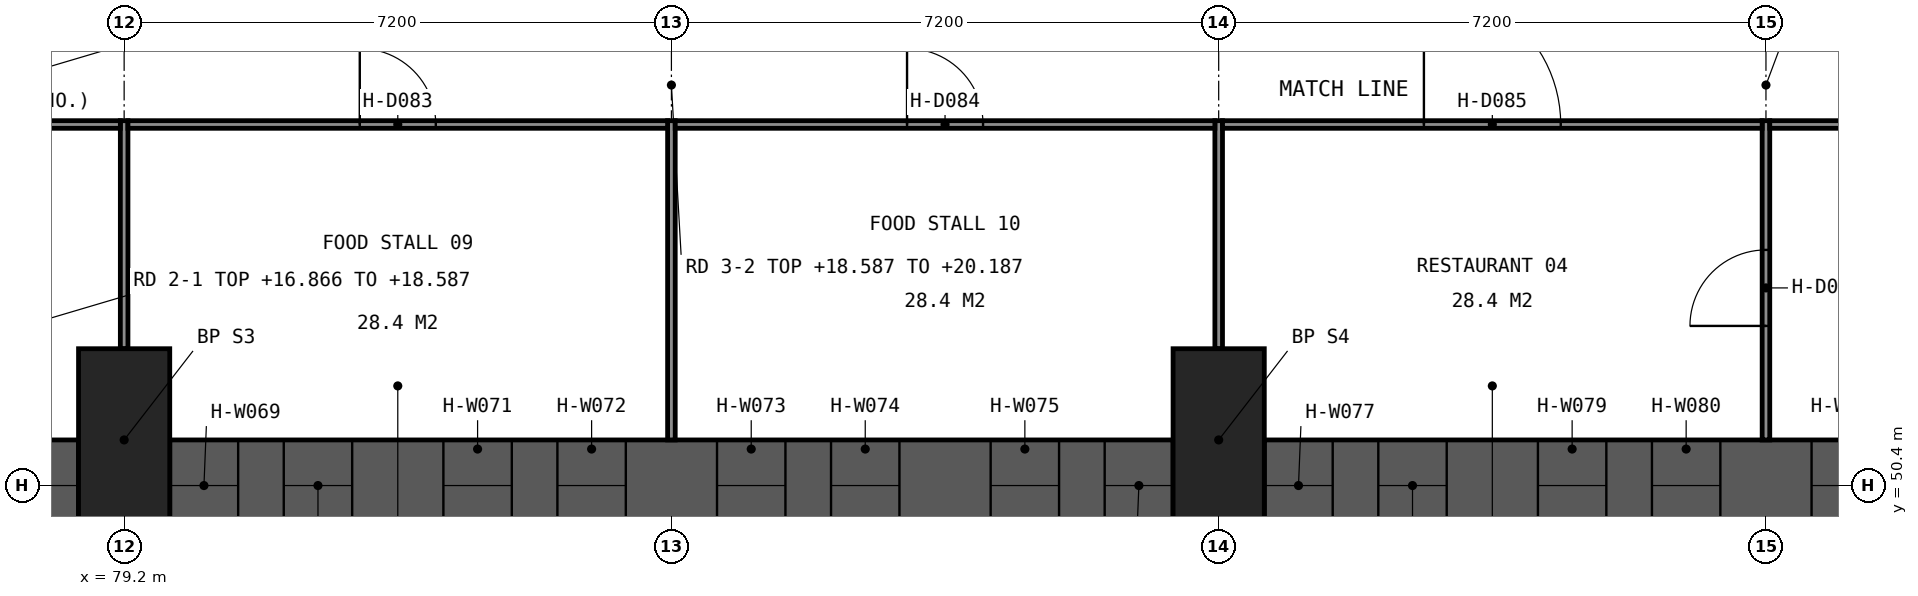
"""IFC4 building model, lengths in metres.
Left out: names, types, materials, properties, quantities, classifications, styles, units other than length and angle.
Written with IfcOpenShell. Run it as: python <this file> out.ifc"""

import sys

from ifc_helpers import new_model, si_unit, direction, frame, frame_2d, origin, origin_2d, place, context, subcontext, project, spatial, rectangle, extrude, element, fill, save


model = new_model("IFC4")
c1 = context("Model", 3, precision=1e-05, world=origin(), true_north=direction((0.0, 1.0)))
c2 = subcontext(c1, "Body", "Model", "MODEL_VIEW")
j1 = project(units=[si_unit("LENGTHUNIT", "METRE"), si_unit("PLANEANGLEUNIT", "RADIAN")], contexts=[c1])
p1 = place(None, origin())
s1 = spatial("IfcSite", under=j1, at=p1, CompositionType="ELEMENT")
p2 = place(p1, origin())
s2 = spatial("IfcBuilding", under=s1, at=p2, CompositionType="ELEMENT")
p3 = place(p2, frame((0.0, 0.0, 9.6)))
s3 = spatial("IfcBuildingStorey", under=s2, at=p3, CompositionType="ELEMENT", Elevation=9.6)
for number, where, z_axis, x_axis in (
    (1, (79.2, 51.0, 0.0), (0.0, 0.0, 1.0), (1.0, 0.0, 0.0)),
    (2, (93.6, 51.0, 0.0), (0.0, 0.0, 1.0), (1.0, 0.0, 0.0)),
):
    element("IfcColumn", number, at=place(p3, frame(where, z_axis=z_axis, x_axis=x_axis)), inside=s3, PredefinedType="COLUMN", context=c2, shape_type="SweptSolid", body=[
        extrude(rectangle(XDim=1.2, YDim=2.4, at=origin_2d()), origin(), (0.0, 0.0, 1.0), 5.4),
    ])
p4 = place(p3, frame((65.4, 50.4, 0.0), z_axis=(0.0, 0.0, 1.0), x_axis=(1.0, 0.0, 0.0)))
e3 = element("IfcWall", 3, at=p4, inside=s3, PredefinedType="SOLIDWALL", context=c2, shape_type="SweptSolid", body=[
    extrude(rectangle(XDim=13.2, YDim=1.2, at=frame_2d((6.6, 0.0))), origin(), (0.0, 0.0, 1.0), 6.6),
])
p5 = place(p4, frame((0.0, 0.0, 1.2)))
e4 = element("IfcOpeningElement", 4, at=p5, cuts=e3, PredefinedType="OPENING", context=c2, shape_type="SweptSolid", body=[
    extrude(rectangle(XDim=0.9, YDim=4.5, at=frame_2d((0.45, 2.25))), frame((0.0, 0.61, 0.0), z_axis=(0.0, -1.0, 0.0), x_axis=(1.0, 0.0, 0.0)), (0.0, 0.0, 1.0), 1.22),
])
p6 = place(p4, frame((1.5, 0.0, 1.2)))
e5 = element("IfcOpeningElement", 5, at=p6, cuts=e3, PredefinedType="OPENING", context=c2, shape_type="SweptSolid", body=[
    extrude(rectangle(XDim=0.9, YDim=4.5, at=frame_2d((0.45, 2.25))), frame((0.0, 0.61, 0.0), z_axis=(0.0, -1.0, 0.0), x_axis=(1.0, 0.0, 0.0)), (0.0, 0.0, 1.0), 1.22),
])
p7 = place(p4, frame((3.6, 0.0, 1.2)))
e6 = element("IfcOpeningElement", 6, at=p7, cuts=e3, PredefinedType="OPENING", context=c2, shape_type="SweptSolid", body=[
    extrude(rectangle(XDim=0.9, YDim=4.5, at=frame_2d((0.45, 2.25))), frame((0.0, 0.61, 0.0), z_axis=(0.0, -1.0, 0.0), x_axis=(1.0, 0.0, 0.0)), (0.0, 0.0, 1.0), 1.22),
])
p8 = place(p4, frame((5.1, 0.0, 1.2)))
e7 = element("IfcOpeningElement", 7, at=p8, cuts=e3, PredefinedType="OPENING", context=c2, shape_type="SweptSolid", body=[
    extrude(rectangle(XDim=0.9, YDim=4.5, at=frame_2d((0.45, 2.25))), frame((0.0, 0.61, 0.0), z_axis=(0.0, -1.0, 0.0), x_axis=(1.0, 0.0, 0.0)), (0.0, 0.0, 1.0), 1.22),
])
p9 = place(p4, frame((7.2, 0.0, 1.2)))
e8 = element("IfcOpeningElement", 8, at=p9, cuts=e3, PredefinedType="OPENING", context=c2, shape_type="SweptSolid", body=[
    extrude(rectangle(XDim=0.9, YDim=4.5, at=frame_2d((0.45, 2.25))), frame((0.0, 0.61, 0.0), z_axis=(0.0, -1.0, 0.0), x_axis=(1.0, 0.0, 0.0)), (0.0, 0.0, 1.0), 1.22),
])
p10 = place(p4, frame((8.7, 0.0, 1.2)))
e9 = element("IfcOpeningElement", 9, at=p10, cuts=e3, PredefinedType="OPENING", context=c2, shape_type="SweptSolid", body=[
    extrude(rectangle(XDim=0.9, YDim=4.5, at=frame_2d((0.45, 2.25))), frame((0.0, 0.61, 0.0), z_axis=(0.0, -1.0, 0.0), x_axis=(1.0, 0.0, 0.0)), (0.0, 0.0, 1.0), 1.22),
])
p11 = place(p4, frame((10.8, 0.0, 1.2)))
e10 = element("IfcOpeningElement", 10, at=p11, cuts=e3, PredefinedType="OPENING", context=c2, shape_type="SweptSolid", body=[
    extrude(rectangle(XDim=0.9, YDim=4.5, at=frame_2d((0.45, 2.25))), frame((0.0, 0.61, 0.0), z_axis=(0.0, -1.0, 0.0), x_axis=(1.0, 0.0, 0.0)), (0.0, 0.0, 1.0), 1.22),
])
p12 = place(p4, frame((12.3, 0.0, 1.2)))
e11 = element("IfcOpeningElement", 11, at=p12, cuts=e3, PredefinedType="OPENING", context=c2, shape_type="SweptSolid", body=[
    extrude(rectangle(XDim=0.9, YDim=4.5, at=frame_2d((0.45, 2.25))), frame((0.0, 0.61, 0.0), z_axis=(0.0, -1.0, 0.0), x_axis=(1.0, 0.0, 0.0)), (0.0, 0.0, 1.0), 1.22),
])
p13 = place(p3, frame((79.8, 50.4, 0.0), z_axis=(0.0, 0.0, 1.0), x_axis=(1.0, 0.0, 0.0)))
e12 = element("IfcWall", 12, at=p13, inside=s3, PredefinedType="SOLIDWALL", context=c2, shape_type="SweptSolid", body=[
    extrude(rectangle(XDim=13.2, YDim=1.2, at=frame_2d((6.6, 0.0))), origin(), (0.0, 0.0, 1.0), 6.6),
])
p14 = place(p13, frame((0.0, 0.0, 1.2)))
e13 = element("IfcOpeningElement", 13, at=p14, cuts=e12, PredefinedType="OPENING", context=c2, shape_type="SweptSolid", body=[
    extrude(rectangle(XDim=0.9, YDim=4.5, at=frame_2d((0.45, 2.25))), frame((0.0, 0.61, 0.0), z_axis=(0.0, -1.0, 0.0), x_axis=(1.0, 0.0, 0.0)), (0.0, 0.0, 1.0), 1.22),
])
p15 = place(p13, frame((1.5, 0.0, 1.2)))
e14 = element("IfcOpeningElement", 14, at=p15, cuts=e12, PredefinedType="OPENING", context=c2, shape_type="SweptSolid", body=[
    extrude(rectangle(XDim=0.9, YDim=4.5, at=frame_2d((0.45, 2.25))), frame((0.0, 0.61, 0.0), z_axis=(0.0, -1.0, 0.0), x_axis=(1.0, 0.0, 0.0)), (0.0, 0.0, 1.0), 1.22),
])
p16 = place(p13, frame((3.6, 0.0, 1.2)))
e15 = element("IfcOpeningElement", 15, at=p16, cuts=e12, PredefinedType="OPENING", context=c2, shape_type="SweptSolid", body=[
    extrude(rectangle(XDim=0.9, YDim=4.5, at=frame_2d((0.45, 2.25))), frame((0.0, 0.61, 0.0), z_axis=(0.0, -1.0, 0.0), x_axis=(1.0, 0.0, 0.0)), (0.0, 0.0, 1.0), 1.22),
])
p17 = place(p13, frame((5.1, 0.0, 1.2)))
e16 = element("IfcOpeningElement", 16, at=p17, cuts=e12, PredefinedType="OPENING", context=c2, shape_type="SweptSolid", body=[
    extrude(rectangle(XDim=0.9, YDim=4.5, at=frame_2d((0.45, 2.25))), frame((0.0, 0.61, 0.0), z_axis=(0.0, -1.0, 0.0), x_axis=(1.0, 0.0, 0.0)), (0.0, 0.0, 1.0), 1.22),
])
p18 = place(p13, frame((7.2, 0.0, 1.2)))
e17 = element("IfcOpeningElement", 17, at=p18, cuts=e12, PredefinedType="OPENING", context=c2, shape_type="SweptSolid", body=[
    extrude(rectangle(XDim=0.9, YDim=4.5, at=frame_2d((0.45, 2.25))), frame((0.0, 0.61, 0.0), z_axis=(0.0, -1.0, 0.0), x_axis=(1.0, 0.0, 0.0)), (0.0, 0.0, 1.0), 1.22),
])
p19 = place(p13, frame((8.7, 0.0, 1.2)))
e18 = element("IfcOpeningElement", 18, at=p19, cuts=e12, PredefinedType="OPENING", context=c2, shape_type="SweptSolid", body=[
    extrude(rectangle(XDim=0.9, YDim=4.5, at=frame_2d((0.45, 2.25))), frame((0.0, 0.61, 0.0), z_axis=(0.0, -1.0, 0.0), x_axis=(1.0, 0.0, 0.0)), (0.0, 0.0, 1.0), 1.22),
])
p20 = place(p13, frame((10.8, 0.0, 1.2)))
e19 = element("IfcOpeningElement", 19, at=p20, cuts=e12, PredefinedType="OPENING", context=c2, shape_type="SweptSolid", body=[
    extrude(rectangle(XDim=0.9, YDim=4.5, at=frame_2d((0.45, 2.25))), frame((0.0, 0.61, 0.0), z_axis=(0.0, -1.0, 0.0), x_axis=(1.0, 0.0, 0.0)), (0.0, 0.0, 1.0), 1.22),
])
p21 = place(p13, frame((12.3, 0.0, 1.2)))
e20 = element("IfcOpeningElement", 20, at=p21, cuts=e12, PredefinedType="OPENING", context=c2, shape_type="SweptSolid", body=[
    extrude(rectangle(XDim=0.9, YDim=4.5, at=frame_2d((0.45, 2.25))), frame((0.0, 0.61, 0.0), z_axis=(0.0, -1.0, 0.0), x_axis=(1.0, 0.0, 0.0)), (0.0, 0.0, 1.0), 1.22),
])
p22 = place(p3, frame((94.2, 50.4, 0.0), z_axis=(0.0, 0.0, 1.0), x_axis=(1.0, 0.0, 0.0)))
e21 = element("IfcWall", 21, at=p22, inside=s3, PredefinedType="SOLIDWALL", context=c2, shape_type="SweptSolid", body=[
    extrude(rectangle(XDim=13.2, YDim=1.2, at=frame_2d((6.6, 0.0))), origin(), (0.0, 0.0, 1.0), 6.6),
])
p23 = place(p22, frame((0.0, 0.0, 1.2)))
e22 = element("IfcOpeningElement", 22, at=p23, cuts=e21, PredefinedType="OPENING", context=c2, shape_type="SweptSolid", body=[
    extrude(rectangle(XDim=0.9, YDim=4.5, at=frame_2d((0.45, 2.25))), frame((0.0, 0.61, 0.0), z_axis=(0.0, -1.0, 0.0), x_axis=(1.0, 0.0, 0.0)), (0.0, 0.0, 1.0), 1.22),
])
p24 = place(p22, frame((1.5, 0.0, 1.2)))
e23 = element("IfcOpeningElement", 23, at=p24, cuts=e21, PredefinedType="OPENING", context=c2, shape_type="SweptSolid", body=[
    extrude(rectangle(XDim=0.9, YDim=4.5, at=frame_2d((0.45, 2.25))), frame((0.0, 0.61, 0.0), z_axis=(0.0, -1.0, 0.0), x_axis=(1.0, 0.0, 0.0)), (0.0, 0.0, 1.0), 1.22),
])
p25 = place(p22, frame((3.6, 0.0, 1.2)))
e24 = element("IfcOpeningElement", 24, at=p25, cuts=e21, PredefinedType="OPENING", context=c2, shape_type="SweptSolid", body=[
    extrude(rectangle(XDim=0.9, YDim=4.5, at=frame_2d((0.45, 2.25))), frame((0.0, 0.61, 0.0), z_axis=(0.0, -1.0, 0.0), x_axis=(1.0, 0.0, 0.0)), (0.0, 0.0, 1.0), 1.22),
])
p26 = place(p22, frame((5.1, 0.0, 1.2)))
e25 = element("IfcOpeningElement", 25, at=p26, cuts=e21, PredefinedType="OPENING", context=c2, shape_type="SweptSolid", body=[
    extrude(rectangle(XDim=0.9, YDim=4.5, at=frame_2d((0.45, 2.25))), frame((0.0, 0.61, 0.0), z_axis=(0.0, -1.0, 0.0), x_axis=(1.0, 0.0, 0.0)), (0.0, 0.0, 1.0), 1.22),
])
p27 = place(p22, frame((7.2, 0.0, 1.2)))
e26 = element("IfcOpeningElement", 26, at=p27, cuts=e21, PredefinedType="OPENING", context=c2, shape_type="SweptSolid", body=[
    extrude(rectangle(XDim=0.9, YDim=4.5, at=frame_2d((0.45, 2.25))), frame((0.0, 0.61, 0.0), z_axis=(0.0, -1.0, 0.0), x_axis=(1.0, 0.0, 0.0)), (0.0, 0.0, 1.0), 1.22),
])
p28 = place(p22, frame((8.7, 0.0, 1.2)))
e27 = element("IfcOpeningElement", 27, at=p28, cuts=e21, PredefinedType="OPENING", context=c2, shape_type="SweptSolid", body=[
    extrude(rectangle(XDim=0.9, YDim=4.5, at=frame_2d((0.45, 2.25))), frame((0.0, 0.61, 0.0), z_axis=(0.0, -1.0, 0.0), x_axis=(1.0, 0.0, 0.0)), (0.0, 0.0, 1.0), 1.22),
])
p29 = place(p22, frame((10.8, 0.0, 1.2)))
e28 = element("IfcOpeningElement", 28, at=p29, cuts=e21, PredefinedType="OPENING", context=c2, shape_type="SweptSolid", body=[
    extrude(rectangle(XDim=0.9, YDim=4.5, at=frame_2d((0.45, 2.25))), frame((0.0, 0.61, 0.0), z_axis=(0.0, -1.0, 0.0), x_axis=(1.0, 0.0, 0.0)), (0.0, 0.0, 1.0), 1.22),
])
p30 = place(p22, frame((12.3, 0.0, 1.2)))
e29 = element("IfcOpeningElement", 29, at=p30, cuts=e21, PredefinedType="OPENING", context=c2, shape_type="SweptSolid", body=[
    extrude(rectangle(XDim=0.9, YDim=4.5, at=frame_2d((0.45, 2.25))), frame((0.0, 0.61, 0.0), z_axis=(0.0, -1.0, 0.0), x_axis=(1.0, 0.0, 0.0)), (0.0, 0.0, 1.0), 1.22),
])
p31 = place(p3, frame((79.2, 52.2, 0.0), z_axis=(0.0, 0.0, 1.0), x_axis=(0.0, 1.0, 0.0)))
e30 = element("IfcWall", 30, at=p31, inside=s3, PredefinedType="PARTITIONING", context=c2, shape_type="SweptSolid", body=[
    extrude(rectangle(XDim=3.0, YDim=0.1, at=frame_2d((1.5, 0.0))), origin(), (0.0, 0.0, 1.0), 4.7),
])
p32 = place(p3, frame((86.4, 51.0, 0.0), z_axis=(0.0, 0.0, 1.0), x_axis=(0.0, 1.0, 0.0)))
e31 = element("IfcWall", 31, at=p32, inside=s3, PredefinedType="PARTITIONING", context=c2, shape_type="SweptSolid", body=[
    extrude(rectangle(XDim=4.2, YDim=0.1, at=frame_2d((2.1, 0.0))), origin(), (0.0, 0.0, 1.0), 4.7),
])
p33 = place(p3, frame((93.6, 52.2, 0.0), z_axis=(0.0, 0.0, 1.0), x_axis=(0.0, 1.0, 0.0)))
e32 = element("IfcWall", 32, at=p33, inside=s3, PredefinedType="PARTITIONING", context=c2, shape_type="SweptSolid", body=[
    extrude(rectangle(XDim=3.0, YDim=0.1, at=frame_2d((1.5, 0.0))), origin(), (0.0, 0.0, 1.0), 4.7),
])
p34 = place(p3, frame((100.8, 51.0, 0.0), z_axis=(0.0, 0.0, 1.0), x_axis=(0.0, 1.0, 0.0)))
e33 = element("IfcWall", 33, at=p34, inside=s3, PredefinedType="PARTITIONING", context=c2, shape_type="SweptSolid", body=[
    extrude(rectangle(XDim=4.2, YDim=0.1, at=frame_2d((2.1, 0.0))), origin(), (0.0, 0.0, 1.0), 4.7),
])
p35 = place(p34, frame((1.5, 0.0, 0.0)))
e34 = element("IfcOpeningElement", 34, at=p35, cuts=e33, PredefinedType="OPENING", context=c2, shape_type="SweptSolid", body=[
    extrude(rectangle(XDim=1.0, YDim=2.1, at=frame_2d((0.5, 1.05))), frame((0.0, 0.06, 0.0), z_axis=(0.0, -1.0, 0.0), x_axis=(1.0, 0.0, 0.0)), (0.0, 0.0, 1.0), 0.12),
])
p36 = place(p3, frame((64.85, 55.15, 0.0), z_axis=(0.0, 0.0, 1.0), x_axis=(1.0, 0.0, 0.0)))
e35 = element("IfcWall", 35, at=p36, inside=s3, PredefinedType="PARTITIONING", context=c2, shape_type="SweptSolid", body=[
    extrude(rectangle(XDim=14.3, YDim=0.1, at=frame_2d((7.15, 0.0))), origin(), (0.0, 0.0, 1.0), 4.7),
])
p37 = place(p36, frame((6.65, 0.0, 0.0)))
e36 = element("IfcOpeningElement", 36, at=p37, cuts=e35, PredefinedType="OPENING", context=c2, shape_type="SweptSolid", body=[
    extrude(rectangle(XDim=1.0, YDim=2.1, at=frame_2d((0.5, 1.05))), frame((0.0, 0.06, 0.0), z_axis=(0.0, -1.0, 0.0), x_axis=(1.0, 0.0, 0.0)), (0.0, 0.0, 1.0), 0.12),
])
p38 = place(p3, frame((79.25, 55.15, 0.0), z_axis=(0.0, 0.0, 1.0), x_axis=(1.0, 0.0, 0.0)))
e37 = element("IfcWall", 37, at=p38, inside=s3, PredefinedType="PARTITIONING", context=c2, shape_type="SweptSolid", body=[
    extrude(rectangle(XDim=7.1, YDim=0.1, at=frame_2d((3.55, 0.0))), origin(), (0.0, 0.0, 1.0), 4.7),
])
p39 = place(p38, frame((3.05, 0.0, 0.0)))
e38 = element("IfcOpeningElement", 38, at=p39, cuts=e37, PredefinedType="OPENING", context=c2, shape_type="SweptSolid", body=[
    extrude(rectangle(XDim=1.0, YDim=2.1, at=frame_2d((0.5, 1.05))), frame((0.0, 0.06, 0.0), z_axis=(0.0, -1.0, 0.0), x_axis=(1.0, 0.0, 0.0)), (0.0, 0.0, 1.0), 0.12),
])
p40 = place(p3, frame((86.45, 55.15, 0.0), z_axis=(0.0, 0.0, 1.0), x_axis=(1.0, 0.0, 0.0)))
e39 = element("IfcWall", 39, at=p40, inside=s3, PredefinedType="PARTITIONING", context=c2, shape_type="SweptSolid", body=[
    extrude(rectangle(XDim=7.1, YDim=0.1, at=frame_2d((3.55, 0.0))), origin(), (0.0, 0.0, 1.0), 4.7),
])
p41 = place(p40, frame((3.05, 0.0, 0.0)))
e40 = element("IfcOpeningElement", 40, at=p41, cuts=e39, PredefinedType="OPENING", context=c2, shape_type="SweptSolid", body=[
    extrude(rectangle(XDim=1.0, YDim=2.1, at=frame_2d((0.5, 1.05))), frame((0.0, 0.06, 0.0), z_axis=(0.0, -1.0, 0.0), x_axis=(1.0, 0.0, 0.0)), (0.0, 0.0, 1.0), 0.12),
])
p42 = place(p3, frame((93.65, 55.15, 0.0), z_axis=(0.0, 0.0, 1.0), x_axis=(1.0, 0.0, 0.0)))
e41 = element("IfcWall", 41, at=p42, inside=s3, PredefinedType="PARTITIONING", context=c2, shape_type="SweptSolid", body=[
    extrude(rectangle(XDim=7.1, YDim=0.1, at=frame_2d((3.55, 0.0))), origin(), (0.0, 0.0, 1.0), 4.7),
])
p43 = place(p42, frame((2.65, 0.0, 0.0)))
e42 = element("IfcOpeningElement", 42, at=p43, cuts=e41, PredefinedType="OPENING", context=c2, shape_type="SweptSolid", body=[
    extrude(rectangle(XDim=1.8, YDim=2.1, at=frame_2d((0.9, 1.05))), frame((0.0, 0.06, 0.0), z_axis=(0.0, -1.0, 0.0), x_axis=(1.0, 0.0, 0.0)), (0.0, 0.0, 1.0), 0.12),
])
p44 = place(p3, frame((100.85, 55.15, 0.0), z_axis=(0.0, 0.0, 1.0), x_axis=(1.0, 0.0, 0.0)))
e43 = element("IfcWall", 43, at=p44, inside=s3, PredefinedType="PARTITIONING", context=c2, shape_type="SweptSolid", body=[
    extrude(rectangle(XDim=7.1, YDim=0.1, at=frame_2d((3.55, 0.0))), origin(), (0.0, 0.0, 1.0), 4.7),
])
p45 = place(p44, frame((3.05, 0.0, 0.0)))
e44 = element("IfcOpeningElement", 44, at=p45, cuts=e43, PredefinedType="OPENING", context=c2, shape_type="SweptSolid", body=[
    extrude(rectangle(XDim=1.0, YDim=2.1, at=frame_2d((0.5, 1.05))), frame((0.0, 0.06, 0.0), z_axis=(0.0, -1.0, 0.0), x_axis=(1.0, 0.0, 0.0)), (0.0, 0.0, 1.0), 0.12),
])
p46 = place(p39, origin())
e45 = element("IfcDoor", 45, at=p46, inside=s3, OperationType="SINGLE_SWING_LEFT", PredefinedType="DOOR", context=c2, shape_type="SweptSolid", body=[
    extrude(rectangle(XDim=1.0, YDim=2.1, at=frame_2d((0.5, 1.05))), frame((0.0, 0.025, 0.0), z_axis=(0.0, -1.0, 0.0), x_axis=(1.0, 0.0, 0.0)), (0.0, 0.0, 1.0), 0.05),
])
fill(e38, e45)
p47 = place(p41, origin())
e46 = element("IfcDoor", 46, at=p47, inside=s3, OperationType="SINGLE_SWING_LEFT", PredefinedType="DOOR", context=c2, shape_type="SweptSolid", body=[
    extrude(rectangle(XDim=1.0, YDim=2.1, at=frame_2d((0.5, 1.05))), frame((0.0, 0.025, 0.0), z_axis=(0.0, -1.0, 0.0), x_axis=(1.0, 0.0, 0.0)), (0.0, 0.0, 1.0), 0.05),
])
fill(e40, e46)
p48 = place(p43, origin())
e47 = element("IfcDoor", 47, at=p48, inside=s3, OperationType="DOUBLE_DOOR_SINGLE_SWING", PredefinedType="DOOR", context=c2, shape_type="SweptSolid", body=[
    extrude(rectangle(XDim=1.8, YDim=2.1, at=frame_2d((0.9, 1.05))), frame((0.0, 0.025, 0.0), z_axis=(0.0, -1.0, 0.0), x_axis=(1.0, 0.0, 0.0)), (0.0, 0.0, 1.0), 0.05),
])
fill(e42, e47)
p49 = place(p35, origin())
e48 = element("IfcDoor", 48, at=p49, inside=s3, OperationType="SINGLE_SWING_LEFT", PredefinedType="DOOR", context=c2, shape_type="SweptSolid", body=[
    extrude(rectangle(XDim=1.0, YDim=2.1, at=frame_2d((0.5, 1.05))), frame((0.0, 0.025, 0.0), z_axis=(0.0, -1.0, 0.0), x_axis=(1.0, 0.0, 0.0)), (0.0, 0.0, 1.0), 0.05),
])
fill(e34, e48)
save(model, sys.argv[1])
